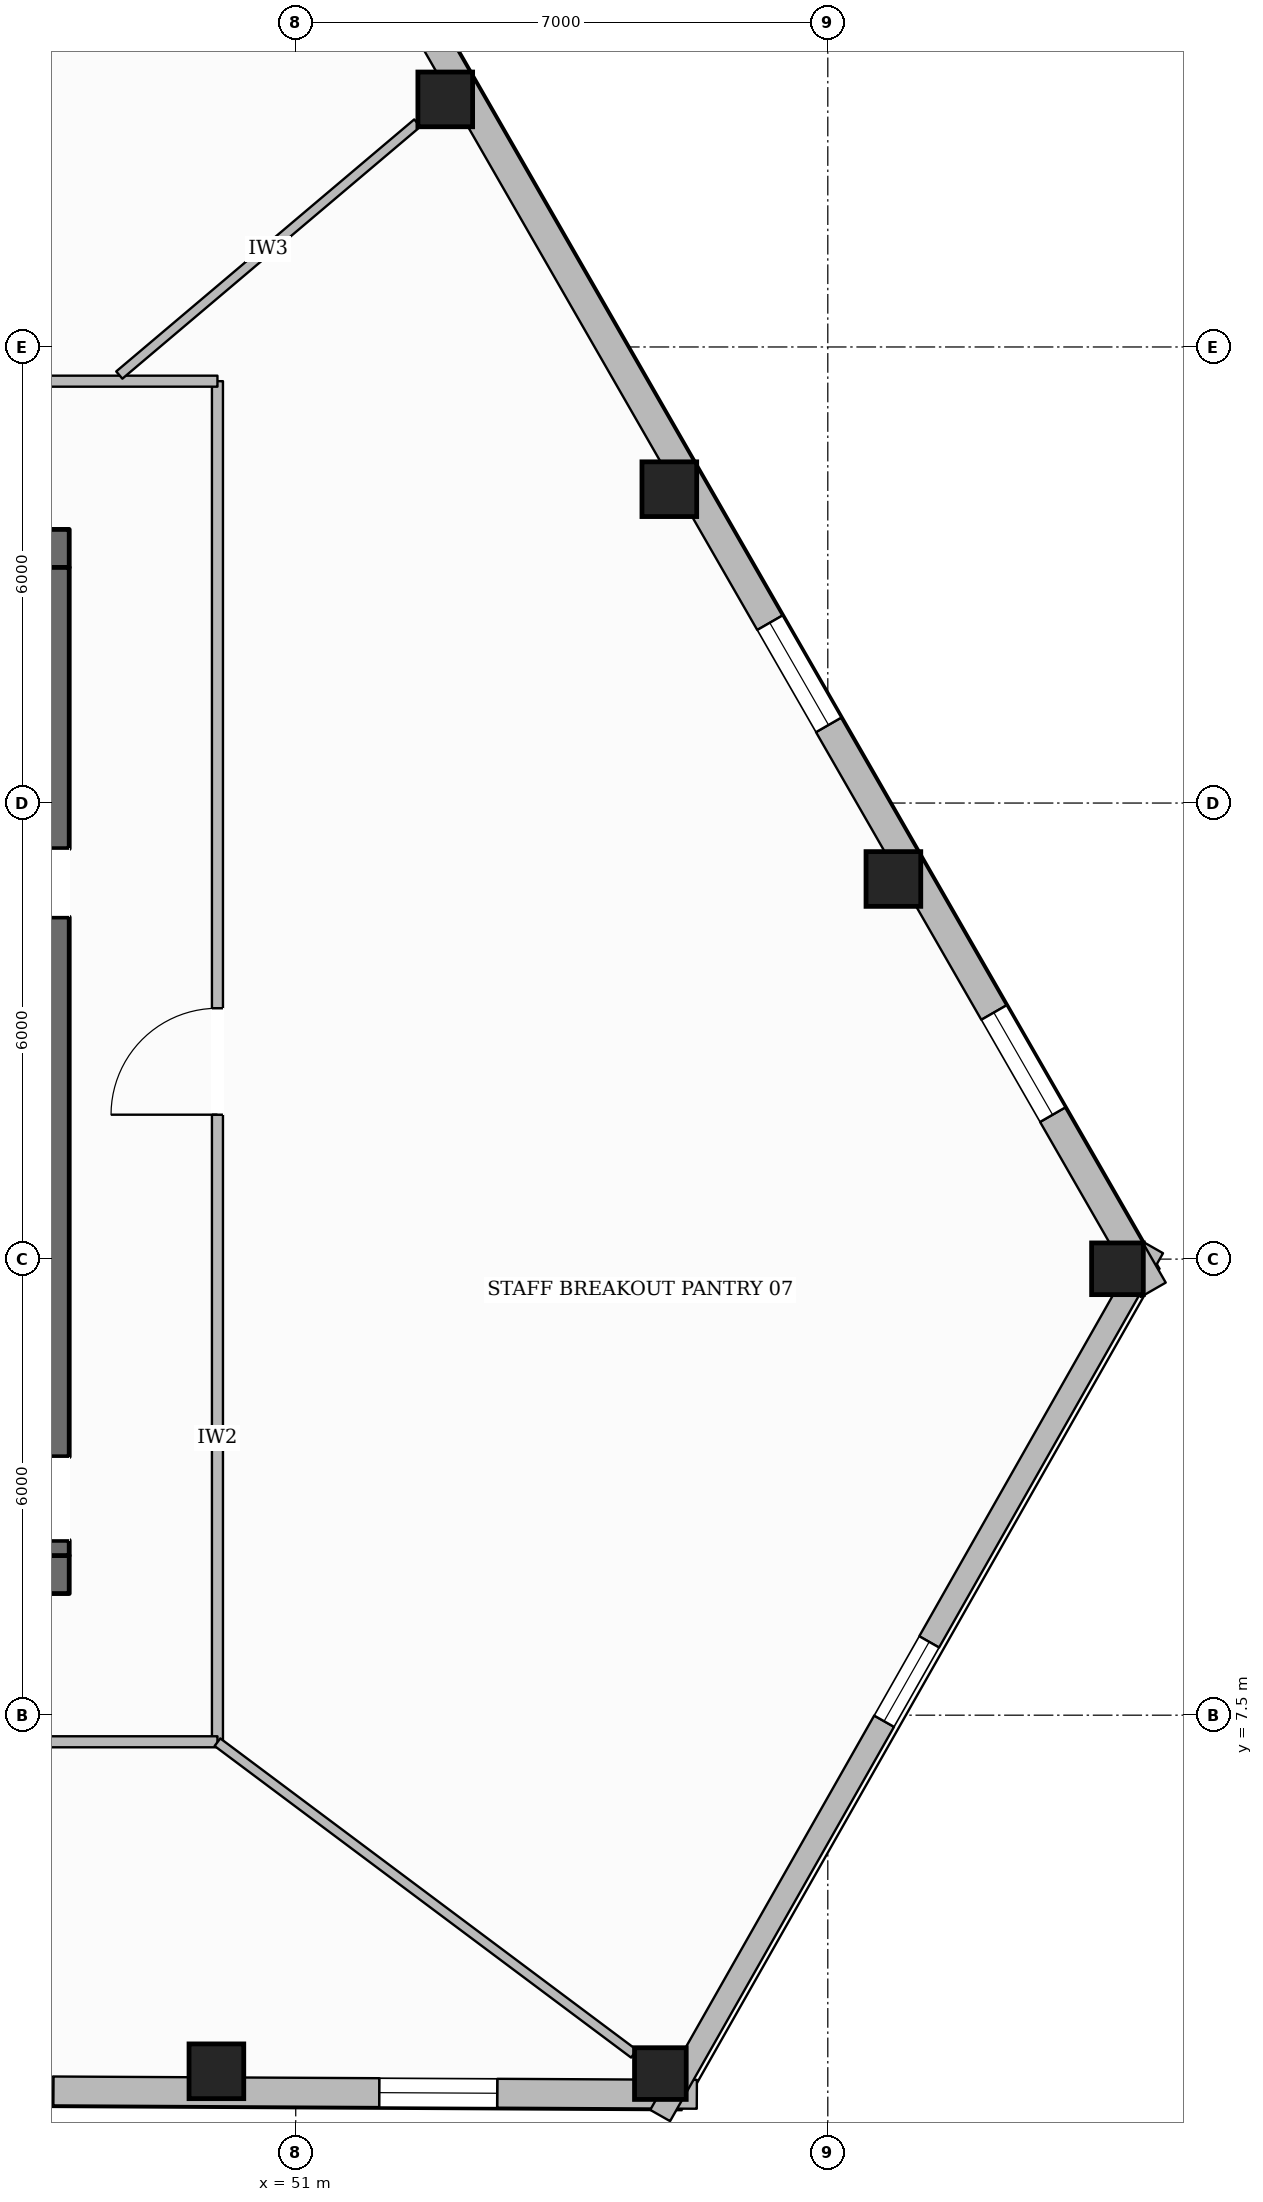
"""IFC4 building model, lengths in metres.
Left out: names, types, materials, properties, quantities, classifications, styles, units other than length and angle.
Written with IfcOpenShell. Run it as: python <this file> out.ifc"""

import sys

from ifc_helpers import new_model, si_unit, direction, frame, frame_2d, origin, origin_2d, place, context, subcontext, project, spatial, rectangle, hollow_rectangle, extrude, element, fill, save


model = new_model("IFC4")
c1 = context("Model", 3, precision=1e-05, world=origin(), true_north=direction((0.0, 1.0)))
c2 = subcontext(c1, "Body", "Model", "MODEL_VIEW")
j1 = project(units=[si_unit("LENGTHUNIT", "METRE"), si_unit("PLANEANGLEUNIT", "RADIAN")], contexts=[c1])
p1 = place(None, origin())
s1 = spatial("IfcSite", under=j1, at=p1, CompositionType="ELEMENT")
p2 = place(p1, origin())
s2 = spatial("IfcBuilding", under=s1, at=p2, CompositionType="ELEMENT")
p3 = place(p2, frame((0.0, 0.0, 108.6)))
s3 = spatial("IfcBuildingStorey", under=s2, at=p3, CompositionType="ELEMENT", Elevation=108.6)
p4 = place(p3, frame((27.98, 9.35, 0.0), z_axis=(0.0, 0.0, 1.0), x_axis=(1.0, 0.0, 0.0)))
e1 = element("IfcWall", 1, at=p4, inside=s3, PredefinedType="SOLIDWALL", context=c2, shape_type="SweptSolid", body=[
    extrude(rectangle(XDim=20.04, YDim=0.5, at=frame_2d((10.02, 0.0))), origin(), (0.0, 0.0, 1.0), 3.6),
])
p5 = place(p4, frame((10.52, 0.0, 0.0)))
e2 = element("IfcOpeningElement", 2, at=p5, cuts=e1, PredefinedType="OPENING", context=c2, shape_type="SweptSolid", body=[
    extrude(rectangle(XDim=1.4, YDim=2.2, at=frame_2d((0.7, 1.1))), frame((0.0, 0.26, 0.0), z_axis=(0.0, -1.0, 0.0), x_axis=(1.0, 0.0, 0.0)), (0.0, 0.0, 1.0), 0.52),
])
p6 = place(p3, frame((27.98, 22.85, 0.0), z_axis=(0.0, 0.0, 1.0), x_axis=(1.0, 0.0, 0.0)))
e3 = element("IfcWall", 3, at=p6, inside=s3, PredefinedType="SOLIDWALL", context=c2, shape_type="SweptSolid", body=[
    extrude(rectangle(XDim=20.04, YDim=0.5, at=frame_2d((10.02, 0.0))), origin(), (0.0, 0.0, 1.0), 3.6),
])
p7 = place(p6, frame((6.295, 0.0, 0.0)))
e4 = element("IfcOpeningElement", 4, at=p7, cuts=e3, PredefinedType="OPENING", context=c2, shape_type="SweptSolid", body=[
    extrude(rectangle(XDim=1.05, YDim=2.15, at=frame_2d((0.525, 1.075))), frame((0.0, 0.26, 0.0), z_axis=(0.0, -1.0, 0.0), x_axis=(1.0, 0.0, 0.0)), (0.0, 0.0, 1.0), 0.52),
])
p8 = place(p6, frame((12.695, 0.0, 0.0)))
e5 = element("IfcOpeningElement", 5, at=p8, cuts=e3, PredefinedType="OPENING", context=c2, shape_type="SweptSolid", body=[
    extrude(rectangle(XDim=1.05, YDim=2.15, at=frame_2d((0.525, 1.075))), frame((0.0, 0.26, 0.0), z_axis=(0.0, -1.0, 0.0), x_axis=(1.0, 0.0, 0.0)), (0.0, 0.0, 1.0), 0.52),
])
p9 = place(p3, frame((47.77, 9.6, 0.0), z_axis=(0.0, 0.0, 1.0), x_axis=(0.0, 1.0, 0.0)))
e6 = element("IfcWall", 6, at=p9, inside=s3, PredefinedType="SOLIDWALL", context=c2, shape_type="SweptSolid", body=[
    extrude(rectangle(XDim=13.0, YDim=0.5, at=frame_2d((6.5, 0.0))), origin(), (0.0, 0.0, 1.0), 3.6),
])
p10 = place(p9, frame((0.2, 0.0, 0.0)))
e7 = element("IfcOpeningElement", 7, at=p10, cuts=e6, PredefinedType="OPENING", context=c2, shape_type="SweptSolid", body=[
    extrude(rectangle(XDim=1.1, YDim=2.15, at=frame_2d((0.55, 1.075))), frame((0.0, 0.26, 0.0), z_axis=(0.0, -1.0, 0.0), x_axis=(1.0, 0.0, 0.0)), (0.0, 0.0, 1.0), 0.52),
])
p11 = place(p9, frame((8.4, 0.0, 0.0)))
e8 = element("IfcOpeningElement", 8, at=p11, cuts=e6, PredefinedType="OPENING", context=c2, shape_type="SweptSolid", body=[
    extrude(rectangle(XDim=0.9, YDim=2.1, at=frame_2d((0.45, 1.05))), frame((0.0, 0.26, 0.0), z_axis=(0.0, -1.0, 0.0), x_axis=(1.0, 0.0, 0.0)), (0.0, 0.0, 1.0), 0.52),
])
p12 = place(p3, frame((49.956, 2.815, 0.0), z_axis=(0.0, 0.0, 1.0), x_axis=(1.0, 0.0, 0.0)))
e9 = element("IfcColumn", 9, at=p12, inside=s3, PredefinedType="COLUMN", context=c2, shape_type="SweptSolid", body=[
    extrude(hollow_rectangle(XDim=0.72, YDim=0.72, WallThickness=0.032, at=origin_2d()), origin(), (0.0, 0.0, 1.0), 3.6),
])
for number, where, z_axis, x_axis in (
    (10, (55.797, 2.785, 0.0), (0.0, 0.0, 1.0), (1.0, 0.0, 0.0)),
    (11, (61.811, 13.373, 0.0), (0.0, 0.0, 1.0), (1.0, 0.0, 0.0)),
):
    element("IfcColumn", number, at=place(p3, frame(where, z_axis=z_axis, x_axis=x_axis)), inside=s3, PredefinedType="COLUMN", context=c2, shape_type="SweptSolid", body=[
        extrude(hollow_rectangle(XDim=0.68, YDim=0.68, WallThickness=0.03, at=origin_2d()), origin(), (0.0, 0.0, 1.0), 3.6),
    ])
for number, where, z_axis, x_axis in (
    (12, (58.863, 18.501, 0.0), (0.0, 0.0, 1.0), (1.0, 0.0, 0.0)),
    (13, (55.915, 23.629, 0.0), (0.0, 0.0, 1.0), (1.0, 0.0, 0.0)),
    (14, (52.967, 28.757, 0.0), (0.0, 0.0, 1.0), (1.0, 0.0, 0.0)),
):
    element("IfcColumn", number, at=place(p3, frame(where, z_axis=z_axis, x_axis=x_axis)), inside=s3, PredefinedType="COLUMN", context=c2, shape_type="SweptSolid", body=[
        extrude(hollow_rectangle(XDim=0.72, YDim=0.72, WallThickness=0.032, at=origin_2d()), origin(), (0.0, 0.0, 1.0), 3.6),
    ])
p13 = place(p3, frame((56.277, 2.512, 0.0), z_axis=(0.0, 0.0, 1.0), x_axis=(-0.999986545033, 0.005187461141, 0.0)))
e15 = element("IfcWall", 15, at=p13, inside=s3, PredefinedType="STANDARD", context=c2, shape_type="SweptSolid", body=[
    extrude(rectangle(XDim=36.004, YDim=0.38, at=frame_2d((18.002, 0.0))), origin(), (0.0, 0.0, 1.0), 3.059),
])
p14 = place(p13, frame((31.832, 0.0, 0.65)))
e16 = element("IfcOpeningElement", 16, at=p14, cuts=e15, PredefinedType="OPENING", context=c2, shape_type="SweptSolid", body=[
    extrude(rectangle(XDim=1.55, YDim=1.75, at=frame_2d((0.775, 0.875))), frame((0.0, 0.2, 0.0), z_axis=(0.0, -1.0, 0.0), x_axis=(1.0, 0.0, 0.0)), (0.0, 0.0, 1.0), 0.4),
])
p15 = place(p13, frame((25.991, 0.0, 0.65)))
e17 = element("IfcOpeningElement", 17, at=p15, cuts=e15, PredefinedType="OPENING", context=c2, shape_type="SweptSolid", body=[
    extrude(rectangle(XDim=1.55, YDim=1.75, at=frame_2d((0.775, 0.875))), frame((0.0, 0.2, 0.0), z_axis=(0.0, -1.0, 0.0), x_axis=(1.0, 0.0, 0.0)), (0.0, 0.0, 1.0), 0.4),
])
p16 = place(p13, frame((14.309, 0.0, 0.65)))
e18 = element("IfcOpeningElement", 18, at=p16, cuts=e15, PredefinedType="OPENING", context=c2, shape_type="SweptSolid", body=[
    extrude(rectangle(XDim=1.55, YDim=1.75, at=frame_2d((0.775, 0.875))), frame((0.0, 0.2, 0.0), z_axis=(0.0, -1.0, 0.0), x_axis=(1.0, 0.0, 0.0)), (0.0, 0.0, 1.0), 0.4),
])
p17 = place(p13, frame((8.468, 0.0, 0.65)))
e19 = element("IfcOpeningElement", 19, at=p17, cuts=e15, PredefinedType="OPENING", context=c2, shape_type="SweptSolid", body=[
    extrude(rectangle(XDim=1.55, YDim=1.75, at=frame_2d((0.775, 0.875))), frame((0.0, 0.2, 0.0), z_axis=(0.0, -1.0, 0.0), x_axis=(1.0, 0.0, 0.0)), (0.0, 0.0, 1.0), 0.4),
])
p18 = place(p13, frame((2.627, 0.0, 0.65)))
e20 = element("IfcOpeningElement", 20, at=p18, cuts=e15, PredefinedType="OPENING", context=c2, shape_type="SweptSolid", body=[
    extrude(rectangle(XDim=1.55, YDim=1.75, at=frame_2d((0.775, 0.875))), frame((0.0, 0.2, 0.0), z_axis=(0.0, -1.0, 0.0), x_axis=(1.0, 0.0, 0.0)), (0.0, 0.0, 1.0), 0.4),
])
p19 = place(p3, frame((62.28, 13.652, 0.0), z_axis=(0.0, 0.0, 1.0), x_axis=(-0.493862788891, -0.869539847131, 0.0)))
e21 = element("IfcWall", 21, at=p19, inside=s3, PredefinedType="STANDARD", context=c2, shape_type="SweptSolid", body=[
    extrude(rectangle(XDim=13.132, YDim=0.3, at=frame_2d((6.566, 0.0))), origin(), (0.0, 0.0, 1.0), 3.059),
])
p20 = place(p19, frame((5.966, 0.0, 0.65)))
e22 = element("IfcOpeningElement", 22, at=p20, cuts=e21, PredefinedType="OPENING", context=c2, shape_type="SweptSolid", body=[
    extrude(rectangle(XDim=1.2, YDim=1.7, at=frame_2d((0.6, 0.85))), frame((0.0, 0.16, 0.0), z_axis=(0.0, -1.0, 0.0), x_axis=(1.0, 0.0, 0.0)), (0.0, 0.0, 1.0), 0.32),
])
p21 = place(p3, frame((44.12, 44.689, 0.0), z_axis=(0.0, 0.0, 1.0), x_axis=(0.498376840975, -0.866960509124, 0.0)))
e23 = element("IfcWall", 23, at=p21, inside=s3, PredefinedType="STANDARD", context=c2, shape_type="SweptSolid", body=[
    extrude(rectangle(XDim=36.441, YDim=0.38, at=frame_2d((18.22, 0.0))), origin(), (0.0, 0.0, 1.0), 3.059),
])
p22 = place(p21, frame((32.234, 0.0, 0.65)))
e24 = element("IfcOpeningElement", 24, at=p22, cuts=e23, PredefinedType="OPENING", context=c2, shape_type="SweptSolid", body=[
    extrude(rectangle(XDim=1.55, YDim=1.75, at=frame_2d((0.775, 0.875))), frame((0.0, 0.2, 0.0), z_axis=(0.0, -1.0, 0.0), x_axis=(1.0, 0.0, 0.0)), (0.0, 0.0, 1.0), 0.4),
])
p23 = place(p21, frame((26.319, 0.0, 0.65)))
e25 = element("IfcOpeningElement", 25, at=p23, cuts=e23, PredefinedType="OPENING", context=c2, shape_type="SweptSolid", body=[
    extrude(rectangle(XDim=1.55, YDim=1.75, at=frame_2d((0.775, 0.875))), frame((0.0, 0.2, 0.0), z_axis=(0.0, -1.0, 0.0), x_axis=(1.0, 0.0, 0.0)), (0.0, 0.0, 1.0), 0.4),
])
p24 = place(p21, frame((14.489, 0.0, 0.65)))
e26 = element("IfcOpeningElement", 26, at=p24, cuts=e23, PredefinedType="OPENING", context=c2, shape_type="SweptSolid", body=[
    extrude(rectangle(XDim=1.55, YDim=1.75, at=frame_2d((0.775, 0.875))), frame((0.0, 0.2, 0.0), z_axis=(0.0, -1.0, 0.0), x_axis=(1.0, 0.0, 0.0)), (0.0, 0.0, 1.0), 0.4),
])
p25 = place(p21, frame((8.573, 0.0, 0.65)))
e27 = element("IfcOpeningElement", 27, at=p25, cuts=e23, PredefinedType="OPENING", context=c2, shape_type="SweptSolid", body=[
    extrude(rectangle(XDim=1.55, YDim=1.75, at=frame_2d((0.775, 0.875))), frame((0.0, 0.2, 0.0), z_axis=(0.0, -1.0, 0.0), x_axis=(1.0, 0.0, 0.0)), (0.0, 0.0, 1.0), 0.4),
])
p26 = place(p21, frame((2.658, 0.0, 0.65)))
e28 = element("IfcOpeningElement", 28, at=p26, cuts=e23, PredefinedType="OPENING", context=c2, shape_type="SweptSolid", body=[
    extrude(rectangle(XDim=1.55, YDim=1.75, at=frame_2d((0.775, 0.875))), frame((0.0, 0.2, 0.0), z_axis=(0.0, -1.0, 0.0), x_axis=(1.0, 0.0, 0.0)), (0.0, 0.0, 1.0), 0.4),
])
p27 = place(p3, frame((49.97, 7.15, 0.0), z_axis=(0.0, 0.0, 1.0), x_axis=(0.0, 1.0, 0.0)))
e29 = element("IfcWall", 29, at=p27, inside=s3, PredefinedType="PARTITIONING", context=c2, shape_type="SweptSolid", body=[
    extrude(rectangle(XDim=17.9, YDim=0.145, at=frame_2d((8.95, 0.0))), origin(), (0.0, 0.0, 1.0), 3.288),
])
p28 = place(p27, frame((8.25, 0.0, 0.0)))
e30 = element("IfcOpeningElement", 30, at=p28, cuts=e29, PredefinedType="OPENING", context=c2, shape_type="SweptSolid", body=[
    extrude(rectangle(XDim=1.4, YDim=2.2, at=frame_2d((0.7, 1.1))), frame((0.0, 0.083, 0.0), z_axis=(0.0, -1.0, 0.0), x_axis=(1.0, 0.0, 0.0)), (0.0, 0.0, 1.0), 0.165),
])
p29 = place(p3, frame((49.97, 25.05, 0.0), z_axis=(0.0, 0.0, 1.0), x_axis=(-1.0, 0.0, 0.0)))
e31 = element("IfcWall", 31, at=p29, inside=s3, PredefinedType="PARTITIONING", context=c2, shape_type="SweptSolid", body=[
    extrude(rectangle(XDim=23.94, YDim=0.145, at=frame_2d((11.97, 0.0))), origin(), (0.0, 0.0, 1.0), 3.6),
])
p30 = place(p29, frame((5.824, 0.0, 0.0)))
e32 = element("IfcOpeningElement", 32, at=p30, cuts=e31, PredefinedType="OPENING", context=c2, shape_type="SweptSolid", body=[
    extrude(rectangle(XDim=1.4, YDim=2.2, at=frame_2d((0.7, 1.1))), frame((0.0, 0.083, 0.0), z_axis=(0.0, -1.0, 0.0), x_axis=(1.0, 0.0, 0.0)), (0.0, 0.0, 1.0), 0.165),
])
p31 = place(p29, frame((16.238, 0.0, 0.0)))
e33 = element("IfcOpeningElement", 33, at=p31, cuts=e31, PredefinedType="OPENING", context=c2, shape_type="SweptSolid", body=[
    extrude(rectangle(XDim=1.4, YDim=2.2, at=frame_2d((0.7, 1.1))), frame((0.0, 0.083, 0.0), z_axis=(0.0, -1.0, 0.0), x_axis=(1.0, 0.0, 0.0)), (0.0, 0.0, 1.0), 0.165),
])
p32 = place(p3, frame((26.03, 7.15, 0.0), z_axis=(0.0, 0.0, 1.0), x_axis=(1.0, 0.0, 0.0)))
e34 = element("IfcWall", 34, at=p32, inside=s3, PredefinedType="PARTITIONING", context=c2, shape_type="SweptSolid", body=[
    extrude(rectangle(XDim=23.94, YDim=0.145, at=frame_2d((11.97, 0.0))), origin(), (0.0, 0.0, 1.0), 3.6),
])
p33 = place(p32, frame((4.53, 0.0, 0.0)))
e35 = element("IfcOpeningElement", 35, at=p33, cuts=e34, PredefinedType="OPENING", context=c2, shape_type="SweptSolid", body=[
    extrude(rectangle(XDim=0.88, YDim=2.1, at=frame_2d((0.44, 1.05))), frame((0.0, 0.083, 0.0), z_axis=(0.0, -1.0, 0.0), x_axis=(1.0, 0.0, 0.0)), (0.0, 0.0, 1.0), 0.165),
])
p34 = place(p32, frame((7.05, 0.0, 0.0)))
e36 = element("IfcOpeningElement", 36, at=p34, cuts=e34, PredefinedType="OPENING", context=c2, shape_type="SweptSolid", body=[
    extrude(rectangle(XDim=0.88, YDim=2.1, at=frame_2d((0.44, 1.05))), frame((0.0, 0.083, 0.0), z_axis=(0.0, -1.0, 0.0), x_axis=(1.0, 0.0, 0.0)), (0.0, 0.0, 1.0), 0.165),
])
p35 = place(p32, frame((9.43, 0.0, 0.0)))
e37 = element("IfcOpeningElement", 37, at=p35, cuts=e34, PredefinedType="OPENING", context=c2, shape_type="SweptSolid", body=[
    extrude(rectangle(XDim=0.96, YDim=2.1, at=frame_2d((0.48, 1.05))), frame((0.0, 0.083, 0.0), z_axis=(0.0, -1.0, 0.0), x_axis=(1.0, 0.0, 0.0)), (0.0, 0.0, 1.0), 0.165),
])
p36 = place(p32, frame((1.456, 0.0, 0.0)))
e38 = element("IfcOpeningElement", 38, at=p36, cuts=e34, PredefinedType="OPENING", context=c2, shape_type="SweptSolid", body=[
    extrude(rectangle(XDim=0.98, YDim=2.15, at=frame_2d((0.49, 1.075))), frame((0.0, 0.083, 0.0), z_axis=(0.0, -1.0, 0.0), x_axis=(1.0, 0.0, 0.0)), (0.0, 0.0, 1.0), 0.165),
])
p37 = place(p32, frame((16.714, 0.0, 0.0)))
e39 = element("IfcOpeningElement", 39, at=p37, cuts=e34, PredefinedType="OPENING", context=c2, shape_type="SweptSolid", body=[
    extrude(rectangle(XDim=1.4, YDim=2.2, at=frame_2d((0.7, 1.1))), frame((0.0, 0.083, 0.0), z_axis=(0.0, -1.0, 0.0), x_axis=(1.0, 0.0, 0.0)), (0.0, 0.0, 1.0), 0.165),
])
p38 = place(p3, frame((48.679, 25.131, 0.0), z_axis=(0.0, 0.0, 1.0), x_axis=(0.763563012799, 0.645733323815, 0.0)))
e40 = element("IfcWall", 40, at=p38, inside=s3, PredefinedType="PARTITIONING", context=c2, shape_type="SweptSolid", body=[
    extrude(rectangle(XDim=5.134, YDim=0.125, at=frame_2d((2.567, 0.0))), origin(), (0.0, 0.0, 1.0), 3.141),
])
p39 = place(p3, frame((49.97, 7.145, 0.0), z_axis=(0.0, 0.0, 1.0), x_axis=(0.800705856265, -0.599057703183, 0.0)))
e41 = element("IfcWall", 41, at=p39, inside=s3, PredefinedType="PARTITIONING", context=c2, shape_type="SweptSolid", body=[
    extrude(rectangle(XDim=6.843, YDim=0.125, at=frame_2d((3.421, 0.0))), origin(), (0.0, 0.0, 1.0), 3.141),
])
p40 = place(p17, origin())
e42 = element("IfcWindow", 42, at=p40, inside=s3, PartitioningType="SINGLE_PANEL", PredefinedType="WINDOW", context=c2, shape_type="SweptSolid", body=[
    extrude(rectangle(XDim=1.55, YDim=1.75, at=frame_2d((0.775, 0.875))), frame((0.0, 0.03, 0.0), z_axis=(0.0, -1.0, 0.0), x_axis=(1.0, 0.0, 0.0)), (0.0, 0.0, 1.0), 0.06),
])
fill(e19, e42)
p41 = place(p18, origin())
e43 = element("IfcWindow", 43, at=p41, inside=s3, PartitioningType="SINGLE_PANEL", PredefinedType="WINDOW", context=c2, shape_type="SweptSolid", body=[
    extrude(rectangle(XDim=1.55, YDim=1.75, at=frame_2d((0.775, 0.875))), frame((0.0, 0.03, 0.0), z_axis=(0.0, -1.0, 0.0), x_axis=(1.0, 0.0, 0.0)), (0.0, 0.0, 1.0), 0.06),
])
fill(e20, e43)
p42 = place(p22, origin())
e44 = element("IfcWindow", 44, at=p42, inside=s3, PartitioningType="SINGLE_PANEL", PredefinedType="WINDOW", context=c2, shape_type="SweptSolid", body=[
    extrude(rectangle(XDim=1.55, YDim=1.75, at=frame_2d((0.775, 0.875))), frame((0.0, 0.03, 0.0), z_axis=(0.0, -1.0, 0.0), x_axis=(1.0, 0.0, 0.0)), (0.0, 0.0, 1.0), 0.06),
])
fill(e24, e44)
p43 = place(p23, origin())
e45 = element("IfcWindow", 45, at=p43, inside=s3, PartitioningType="SINGLE_PANEL", PredefinedType="WINDOW", context=c2, shape_type="SweptSolid", body=[
    extrude(rectangle(XDim=1.55, YDim=1.75, at=frame_2d((0.775, 0.875))), frame((0.0, 0.03, 0.0), z_axis=(0.0, -1.0, 0.0), x_axis=(1.0, 0.0, 0.0)), (0.0, 0.0, 1.0), 0.06),
])
fill(e25, e45)
p44 = place(p20, origin())
e46 = element("IfcWindow", 46, at=p44, inside=s3, PartitioningType="SINGLE_PANEL", PredefinedType="WINDOW", context=c2, shape_type="SweptSolid", body=[
    extrude(rectangle(XDim=1.2, YDim=1.7, at=frame_2d((0.6, 0.85))), frame((0.0, 0.03, 0.0), z_axis=(0.0, -1.0, 0.0), x_axis=(1.0, 0.0, 0.0)), (0.0, 0.0, 1.0), 0.06),
])
fill(e22, e46)
p45 = place(p28, origin())
e47 = element("IfcDoor", 47, at=p45, inside=s3, OperationType="SINGLE_SWING_LEFT", PredefinedType="DOOR", context=c2, shape_type="SweptSolid", body=[
    extrude(rectangle(XDim=1.4, YDim=2.2, at=frame_2d((0.7, 1.1))), frame((0.0, 0.025, 0.0), z_axis=(0.0, -1.0, 0.0), x_axis=(1.0, 0.0, 0.0)), (0.0, 0.0, 1.0), 0.05),
])
fill(e30, e47)
save(model, sys.argv[1])
